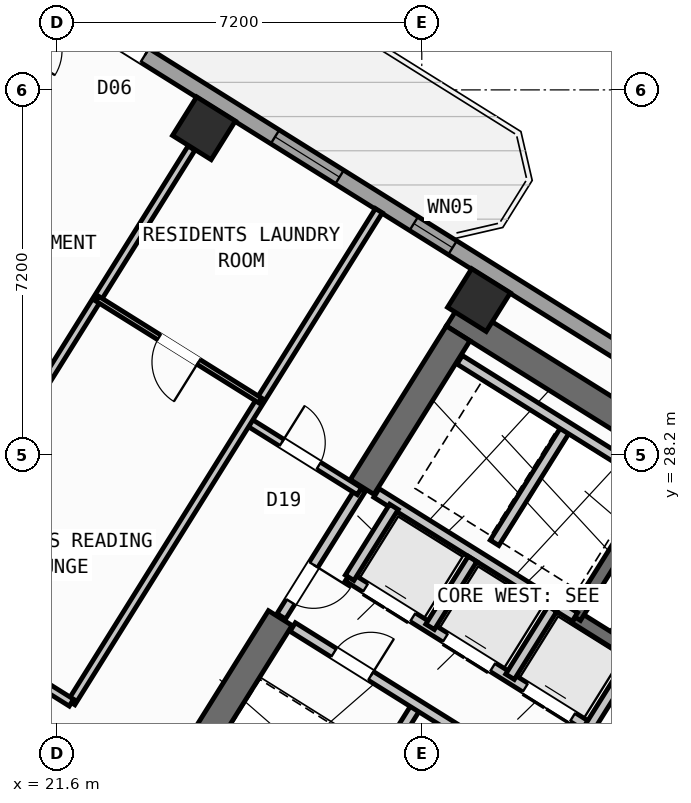
"""IFC4 building model, lengths in metres.
Left out: names, types, materials, properties, quantities, classifications, styles, units other than length and angle.
Written with IfcOpenShell. Run it as: python <this file> out.ifc"""

import sys

from ifc_helpers import new_model, si_unit, direction, frame, frame_2d, origin, origin_2d, place, context, subcontext, project, spatial, rectangle, hollow_rectangle, extrude, source, transform, mapped, element, fill, save


model = new_model("IFC4")
c1 = context("Model", 3, precision=1e-05, world=origin(), true_north=direction((0.0, 1.0)))
c2 = subcontext(c1, "Body", "Model", "MODEL_VIEW")
j1 = project(units=[si_unit("LENGTHUNIT", "METRE"), si_unit("PLANEANGLEUNIT", "RADIAN")], contexts=[c1])
p1 = place(None, origin())
s1 = spatial("IfcSite", under=j1, at=p1, CompositionType="ELEMENT")
p2 = place(p1, origin())
s2 = spatial("IfcBuilding", under=s1, at=p2, CompositionType="ELEMENT")
p3 = place(p2, frame((0.0, 0.0, 155.1)))
s3 = spatial("IfcBuildingStorey", under=s2, at=p3, CompositionType="ELEMENT", Elevation=155.1)
p4 = place(p3, frame((40.573, 24.01, 0.0), z_axis=(0.0, 0.0, 1.0), x_axis=(-0.848047359947, 0.529920442413, 0.0)))
e1 = element("IfcWall", 1, at=p4, inside=s3, PredefinedType="SHEAR", context=c2, shape_type="SweptSolid", body=[
    extrude(rectangle(XDim=13.14, YDim=0.55, at=frame_2d((6.57, 0.0))), origin(), (0.0, 0.0, 1.0), 3.35),
])
p5 = place(p3, frame((29.517, 30.594, 0.0), z_axis=(0.0, 0.0, 1.0), x_axis=(-0.529906864564, -0.848055844204, 0.0)))
e2 = element("IfcWall", 2, at=p5, inside=s3, PredefinedType="SHEAR", context=c2, shape_type="SweptSolid", body=[
    extrude(rectangle(XDim=3.575, YDim=0.55, at=frame_2d((1.788, 0.0))), origin(), (0.0, 0.0, 1.0), 3.35),
])
p6 = place(p3, frame((26.007, 24.976, 0.0), z_axis=(0.0, 0.0, 1.0), x_axis=(-0.529923795287, -0.848045264823, 0.0)))
e3 = element("IfcWall", 3, at=p6, inside=s3, PredefinedType="SHEAR", context=c2, shape_type="SweptSolid", body=[
    extrude(rectangle(XDim=6.425, YDim=0.55, at=frame_2d((3.212, 0.0))), origin(), (0.0, 0.0, 1.0), 3.35),
])
m1 = source(origin(), c2, "Body", "SweptSolid", [
    extrude(hollow_rectangle(XDim=0.9, YDim=0.9, WallThickness=0.036, at=origin_2d()), origin(), (0.0, 0.0, 1.0), 3.6),
])
for number, where, z_axis, x_axis in (
    (4, (29.928, 31.251, 0.0), (0.0, 0.0, 1.0), (-0.848, 0.53, 0.0)),
    (5, (24.5, 34.643, 0.0), (0.0, 0.0, 1.0), (-0.848, 0.53, 0.0)),
):
    element("IfcColumn", number, at=place(p3, frame(where, z_axis=z_axis, x_axis=x_axis)), inside=s3, PredefinedType="COLUMN", context=c2, shape_type="MappedRepresentation", body=[
        mapped(m1, transform((0.0, 0.0, 0.0), scale=1.0)),
    ])
p7 = place(p3, frame((29.268, 6.429, 0.0), z_axis=(0.0, 0.0, 1.0), x_axis=(-0.848049971435, 0.529916263149, 0.0)))
e6 = element("IfcWall", 6, at=p7, inside=s3, PredefinedType="STANDARD", context=c2, shape_type="SweptSolid", body=[
    extrude(rectangle(XDim=31.588, YDim=0.32, at=frame_2d((15.794, 0.0))), origin(), (0.0, 0.0, 1.0), 3.35),
])
p8 = place(p7, frame((16.362, 0.0, 0.0)))
e7 = element("IfcOpeningElement", 7, at=p8, cuts=e6, PredefinedType="OPENING", context=c2, shape_type="SweptSolid", body=[
    extrude(rectangle(XDim=1.2, YDim=2.15, at=frame_2d((0.6, 1.075))), frame((0.0, 0.17, 0.0), z_axis=(0.0, -1.0, 0.0), x_axis=(1.0, 0.0, 0.0)), (0.0, 0.0, 1.0), 0.34),
])
p9 = place(p7, frame((2.989, 0.0, 0.8)))
e8 = element("IfcOpeningElement", 8, at=p9, cuts=e6, PredefinedType="OPENING", context=c2, shape_type="SweptSolid", body=[
    extrude(rectangle(XDim=2.1, YDim=1.55, at=frame_2d((1.05, 0.775))), frame((0.0, 0.17, 0.0), z_axis=(0.0, -1.0, 0.0), x_axis=(1.0, 0.0, 0.0)), (0.0, 0.0, 1.0), 0.34),
])
p10 = place(p7, frame((8.359, 0.0, 0.8)))
e9 = element("IfcOpeningElement", 9, at=p10, cuts=e6, PredefinedType="OPENING", context=c2, shape_type="SweptSolid", body=[
    extrude(rectangle(XDim=2.1, YDim=1.55, at=frame_2d((1.05, 0.775))), frame((0.0, 0.17, 0.0), z_axis=(0.0, -1.0, 0.0), x_axis=(1.0, 0.0, 0.0)), (0.0, 0.0, 1.0), 0.34),
])
p11 = place(p7, frame((13.284, 0.0, 0.95)))
e10 = element("IfcOpeningElement", 10, at=p11, cuts=e6, PredefinedType="OPENING", context=c2, shape_type="SweptSolid", body=[
    extrude(rectangle(XDim=1.2, YDim=1.4, at=frame_2d((0.6, 0.7))), frame((0.0, 0.17, 0.0), z_axis=(0.0, -1.0, 0.0), x_axis=(1.0, 0.0, 0.0)), (0.0, 0.0, 1.0), 0.34),
])
p12 = place(p7, frame((20.259, 0.0, 0.95)))
e11 = element("IfcOpeningElement", 11, at=p12, cuts=e6, PredefinedType="OPENING", context=c2, shape_type="SweptSolid", body=[
    extrude(rectangle(XDim=1.2, YDim=1.4, at=frame_2d((0.6, 0.7))), frame((0.0, 0.17, 0.0), z_axis=(0.0, -1.0, 0.0), x_axis=(1.0, 0.0, 0.0)), (0.0, 0.0, 1.0), 0.34),
])
p13 = place(p7, frame((22.929, 0.0, 0.95)))
e12 = element("IfcOpeningElement", 12, at=p13, cuts=e6, PredefinedType="OPENING", context=c2, shape_type="SweptSolid", body=[
    extrude(rectangle(XDim=1.2, YDim=1.4, at=frame_2d((0.6, 0.7))), frame((0.0, 0.17, 0.0), z_axis=(0.0, -1.0, 0.0), x_axis=(1.0, 0.0, 0.0)), (0.0, 0.0, 1.0), 0.34),
])
p14 = place(p7, frame((27.481, 0.0, 0.8)))
e13 = element("IfcOpeningElement", 13, at=p14, cuts=e6, PredefinedType="OPENING", context=c2, shape_type="SweptSolid", body=[
    extrude(rectangle(XDim=2.1, YDim=1.55, at=frame_2d((1.05, 0.775))), frame((0.0, 0.17, 0.0), z_axis=(0.0, -1.0, 0.0), x_axis=(1.0, 0.0, 0.0)), (0.0, 0.0, 1.0), 0.34),
])
p15 = place(p3, frame((14.138, 41.825, 0.0), z_axis=(0.0, 0.0, 1.0), x_axis=(0.848046498049, -0.529921821731, 0.0)))
e14 = element("IfcWall", 14, at=p15, inside=s3, PredefinedType="STANDARD", context=c2, shape_type="SweptSolid", body=[
    extrude(rectangle(XDim=31.588, YDim=0.32, at=frame_2d((15.794, 0.0))), origin(), (0.0, 0.0, 1.0), 3.35),
])
p16 = place(p15, frame((9.792, 0.0, 0.0)))
e15 = element("IfcOpeningElement", 15, at=p16, cuts=e14, PredefinedType="OPENING", context=c2, shape_type="SweptSolid", body=[
    extrude(rectangle(XDim=1.05, YDim=2.15, at=frame_2d((0.525, 1.075))), frame((0.0, 0.17, 0.0), z_axis=(0.0, -1.0, 0.0), x_axis=(1.0, 0.0, 0.0)), (0.0, 0.0, 1.0), 0.34),
])
p17 = place(p15, frame((0.791, 0.0, 0.85)))
e16 = element("IfcOpeningElement", 16, at=p17, cuts=e14, PredefinedType="OPENING", context=c2, shape_type="SweptSolid", body=[
    extrude(rectangle(XDim=1.8, YDim=1.5, at=frame_2d((0.9, 0.75))), frame((0.0, 0.17, 0.0), z_axis=(0.0, -1.0, 0.0), x_axis=(1.0, 0.0, 0.0)), (0.0, 0.0, 1.0), 0.34),
])
p18 = place(p15, frame((3.996, 0.0, 0.95)))
e17 = element("IfcOpeningElement", 17, at=p18, cuts=e14, PredefinedType="OPENING", context=c2, shape_type="SweptSolid", body=[
    extrude(rectangle(XDim=1.2, YDim=1.4, at=frame_2d((0.6, 0.7))), frame((0.0, 0.17, 0.0), z_axis=(0.0, -1.0, 0.0), x_axis=(1.0, 0.0, 0.0)), (0.0, 0.0, 1.0), 0.34),
])
p19 = place(p15, frame((13.874, 0.0, 0.85)))
e18 = element("IfcOpeningElement", 18, at=p19, cuts=e14, PredefinedType="OPENING", context=c2, shape_type="SweptSolid", body=[
    extrude(rectangle(XDim=1.5, YDim=1.5, at=frame_2d((0.75, 0.75))), frame((0.0, 0.17, 0.0), z_axis=(0.0, -1.0, 0.0), x_axis=(1.0, 0.0, 0.0)), (0.0, 0.0, 1.0), 0.34),
])
p20 = place(p15, frame((17.104, 0.0, 1.0)))
e19 = element("IfcOpeningElement", 19, at=p20, cuts=e14, PredefinedType="OPENING", context=c2, shape_type="SweptSolid", body=[
    extrude(rectangle(XDim=0.9, YDim=1.25, at=frame_2d((0.45, 0.625))), frame((0.0, 0.17, 0.0), z_axis=(0.0, -1.0, 0.0), x_axis=(1.0, 0.0, 0.0)), (0.0, 0.0, 1.0), 0.34),
])
p21 = place(p15, frame((22.069, 0.0, 1.0)))
e20 = element("IfcOpeningElement", 20, at=p21, cuts=e14, PredefinedType="OPENING", context=c2, shape_type="SweptSolid", body=[
    extrude(rectangle(XDim=0.9, YDim=1.25, at=frame_2d((0.45, 0.625))), frame((0.0, 0.17, 0.0), z_axis=(0.0, -1.0, 0.0), x_axis=(1.0, 0.0, 0.0)), (0.0, 0.0, 1.0), 0.34),
])
p22 = place(p15, frame((27.519, 0.0, 1.0)))
e21 = element("IfcOpeningElement", 21, at=p22, cuts=e14, PredefinedType="OPENING", context=c2, shape_type="SweptSolid", body=[
    extrude(rectangle(XDim=0.9, YDim=1.25, at=frame_2d((0.45, 0.625))), frame((0.0, 0.17, 0.0), z_axis=(0.0, -1.0, 0.0), x_axis=(1.0, 0.0, 0.0)), (0.0, 0.0, 1.0), 0.34),
])
p23 = place(p3, frame((38.046, 21.108, 0.0), z_axis=(0.0, 0.0, 1.0), x_axis=(-0.848054434086, 0.529909121291, 0.0)))
e22 = element("IfcWall", 22, at=p23, inside=s3, PredefinedType="SHEAR", context=c2, shape_type="SweptSolid", body=[
    extrude(rectangle(XDim=7.33, YDim=0.26, at=frame_2d((3.665, 0.0))), origin(), (0.0, 0.0, 1.0), 3.35),
])
p24 = place(p23, frame((0.22, 0.0, 0.0)))
e23 = element("IfcOpeningElement", 23, at=p24, cuts=e22, PredefinedType="OPENING", context=c2, shape_type="SweptSolid", body=[
    extrude(rectangle(XDim=1.1, YDim=2.1, at=frame_2d((0.55, 1.05))), frame((0.0, 0.14, 0.0), z_axis=(0.0, -1.0, 0.0), x_axis=(1.0, 0.0, 0.0)), (0.0, 0.0, 1.0), 0.28),
])
p25 = place(p3, frame((33.496, 27.677, 0.0), z_axis=(0.0, 0.0, 1.0), x_axis=(-0.529908658664, -0.84805472316, 0.0)))
e24 = element("IfcWall", 24, at=p25, inside=s3, PredefinedType="SHEAR", context=c2, shape_type="SweptSolid", body=[
    extrude(rectangle(XDim=3.16, YDim=0.26, at=frame_2d((1.58, 0.0))), origin(), (0.0, 0.0, 1.0), 3.35),
])
p26 = place(p3, frame((31.822, 24.998, 0.0), z_axis=(0.0, 0.0, 1.0), x_axis=(-0.848036912365, 0.52993716162, 0.0)))
e25 = element("IfcWall", 25, at=p26, inside=s3, PredefinedType="STANDARD", context=c2, shape_type="SweptSolid", body=[
    extrude(rectangle(XDim=4.618, YDim=0.2, at=frame_2d((2.309, 0.0))), origin(), (0.0, 0.0, 1.0), 3.34),
])
p27 = place(p3, frame((32.108, 22.814, 0.0), z_axis=(0.0, 0.0, 1.0), x_axis=(-0.848042229521, 0.529928652696, 0.0)))
e26 = element("IfcWall", 26, at=p27, inside=s3, PredefinedType="STANDARD", context=c2, shape_type="SweptSolid", body=[
    extrude(rectangle(XDim=5.62, YDim=0.2, at=frame_2d((2.81, 0.0))), origin(), (0.0, 0.0, 1.0), 3.34),
])
p28 = place(p27, frame((0.39, 0.0, 0.0)))
e27 = element("IfcOpeningElement", 27, at=p28, cuts=e26, PredefinedType="OPENING", context=c2, shape_type="SweptSolid", body=[
    extrude(rectangle(XDim=1.1, YDim=2.15, at=frame_2d((0.55, 1.075))), frame((0.0, 0.11, 0.0), z_axis=(0.0, -1.0, 0.0), x_axis=(1.0, 0.0, 0.0)), (0.0, 0.0, 1.0), 0.22),
])
p29 = place(p27, frame((2.25, 0.0, 0.0)))
e28 = element("IfcOpeningElement", 28, at=p29, cuts=e26, PredefinedType="OPENING", context=c2, shape_type="SweptSolid", body=[
    extrude(rectangle(XDim=1.1, YDim=2.15, at=frame_2d((0.55, 1.075))), frame((0.0, 0.11, 0.0), z_axis=(0.0, -1.0, 0.0), x_axis=(1.0, 0.0, 0.0)), (0.0, 0.0, 1.0), 0.22),
])
p30 = place(p27, frame((4.11, 0.0, 0.0)))
e29 = element("IfcOpeningElement", 29, at=p30, cuts=e26, PredefinedType="OPENING", context=c2, shape_type="SweptSolid", body=[
    extrude(rectangle(XDim=1.1, YDim=2.15, at=frame_2d((0.55, 1.075))), frame((0.0, 0.11, 0.0), z_axis=(0.0, -1.0, 0.0), x_axis=(1.0, 0.0, 0.0)), (0.0, 0.0, 1.0), 0.22),
])
p31 = place(p3, frame((32.982, 24.213, 0.0), z_axis=(0.0, 0.0, 1.0), x_axis=(-0.529839334948, -0.84809803628, 0.0)))
e30 = element("IfcWall", 30, at=p31, inside=s3, PredefinedType="STANDARD", context=c2, shape_type="SweptSolid", body=[
    extrude(rectangle(XDim=1.65, YDim=0.2, at=frame_2d((0.825, 0.0))), origin(), (0.0, 0.0, 1.0), 3.34),
])
p32 = place(p3, frame((28.25, 27.17, 0.0), z_axis=(0.0, 0.0, 1.0), x_axis=(-0.529905827651, -0.848056492117, 0.0)))
e31 = element("IfcWall", 31, at=p32, inside=s3, PredefinedType="STANDARD", context=c2, shape_type="SweptSolid", body=[
    extrude(rectangle(XDim=1.65, YDim=0.2, at=frame_2d((0.825, 0.0))), origin(), (0.0, 0.0, 1.0), 3.34),
])
p33 = place(p3, frame((31.645, 28.716, 0.0), z_axis=(0.0, 0.0, 1.0), x_axis=(-0.52986693015, -0.848080795876, 0.0)))
e32 = element("IfcWall", 32, at=p33, inside=s3, PredefinedType="STANDARD", context=c2, shape_type="SweptSolid", body=[
    extrude(rectangle(XDim=2.66, YDim=0.2, at=frame_2d((1.33, 0.0))), origin(), (0.0, 0.0, 1.0), 3.34),
])
p34 = place(p3, frame((33.363, 27.69, 0.0), z_axis=(0.0, 0.0, 1.0), x_axis=(-0.848047090064, 0.529920874315, 0.0)))
e33 = element("IfcWall", 33, at=p34, inside=s3, PredefinedType="STANDARD", context=c2, shape_type="SweptSolid", body=[
    extrude(rectangle(XDim=4.498, YDim=0.2, at=frame_2d((2.249, 0.0))), origin(), (0.0, 0.0, 1.0), 3.34),
])
for number, where, z_axis, x_axis in (
    (34, (31.379, 25.156, 0.0), (0.0, 0.0, 1.0), (-0.53, -0.848, 0.0)),
    (35, (29.801, 26.142, 0.0), (0.0, 0.0, 1.0), (-0.53, -0.848, 0.0)),
):
    element("IfcWall", number, at=place(p3, frame(where, z_axis=z_axis, x_axis=x_axis)), inside=s3, PredefinedType="STANDARD", context=c2, shape_type="SweptSolid", body=[
        extrude(rectangle(XDim=1.58, YDim=0.2, at=frame_2d((0.79, 0.0))), origin(), (0.0, 0.0, 1.0), 3.34),
    ])
p35 = place(p3, frame((28.71, 23.263, 0.0), z_axis=(0.0, 0.0, 1.0), x_axis=(-0.529907497854, -0.848055448493, 0.0)))
e36 = element("IfcWall", 36, at=p35, inside=s3, PredefinedType="STANDARD", context=c2, shape_type="SweptSolid", body=[
    extrude(rectangle(XDim=2.88, YDim=0.2, at=frame_2d((1.44, 0.0))), origin(), (0.0, 0.0, 1.0), 3.34),
])
p36 = place(p3, frame((31.525, 21.504, 0.0), z_axis=(0.0, 0.0, 1.0), x_axis=(-0.848040211232, 0.529931882541, 0.0)))
e37 = element("IfcWall", 37, at=p36, inside=s3, PredefinedType="STANDARD", context=c2, shape_type="SweptSolid", body=[
    extrude(rectangle(XDim=6.218, YDim=0.2, at=frame_2d((3.109, 0.0))), origin(), (0.0, 0.0, 1.0), 3.34),
])
p37 = place(p36, frame((4.4, 0.0, 0.0)))
e38 = element("IfcOpeningElement", 38, at=p37, cuts=e37, PredefinedType="OPENING", context=c2, shape_type="SweptSolid", body=[
    extrude(rectangle(XDim=0.86, YDim=2.05, at=frame_2d((0.43, 1.025))), frame((0.0, 0.11, 0.0), z_axis=(0.0, -1.0, 0.0), x_axis=(1.0, 0.0, 0.0)), (0.0, 0.0, 1.0), 0.22),
])
p38 = place(p36, frame((0.35, 0.0, 0.0)))
e39 = element("IfcOpeningElement", 39, at=p38, cuts=e37, PredefinedType="OPENING", context=c2, shape_type="SweptSolid", body=[
    extrude(rectangle(XDim=0.86, YDim=2.05, at=frame_2d((0.43, 1.025))), frame((0.0, 0.11, 0.0), z_axis=(0.0, -1.0, 0.0), x_axis=(1.0, 0.0, 0.0)), (0.0, 0.0, 1.0), 0.22),
])
p39 = place(p3, frame((27.596, 27.52, 0.0), z_axis=(0.0, 0.0, 1.0), x_axis=(-0.529865479138, -0.848081702443, 0.0)))
e40 = element("IfcWall", 40, at=p39, inside=s3, PredefinedType="STANDARD", context=c2, shape_type="SweptSolid", body=[
    extrude(rectangle(XDim=2.96, YDim=0.2, at=frame_2d((1.48, 0.0))), origin(), (0.0, 0.0, 1.0), 3.34),
])
p40 = place(p39, frame((1.76, 0.0, 0.0)))
e41 = element("IfcOpeningElement", 41, at=p40, cuts=e40, PredefinedType="OPENING", context=c2, shape_type="SweptSolid", body=[
    extrude(rectangle(XDim=0.86, YDim=2.05, at=frame_2d((0.43, 1.025))), frame((0.0, 0.11, 0.0), z_axis=(0.0, -1.0, 0.0), x_axis=(1.0, 0.0, 0.0)), (0.0, 0.0, 1.0), 0.22),
])
p41 = place(p3, frame((27.57, 27.478, 0.0), z_axis=(0.0, 0.0, 1.0), x_axis=(-0.848050851465, 0.529914854792, 0.0)))
e42 = element("IfcWall", 42, at=p41, inside=s3, PredefinedType="PARTITIONING", context=c2, shape_type="SweptSolid", body=[
    extrude(rectangle(XDim=2.61, YDim=0.16, at=frame_2d((1.305, 0.0))), origin(), (0.0, 0.0, 1.0), 3.34),
])
p42 = place(p41, frame((0.95, 0.0, 0.0)))
e43 = element("IfcOpeningElement", 43, at=p42, cuts=e42, PredefinedType="OPENING", context=c2, shape_type="SweptSolid", body=[
    extrude(rectangle(XDim=0.86, YDim=2.05, at=frame_2d((0.43, 1.025))), frame((0.0, 0.09, 0.0), z_axis=(0.0, -1.0, 0.0), x_axis=(1.0, 0.0, 0.0)), (0.0, 0.0, 1.0), 0.18),
])
p43 = place(p3, frame((27.953, 33.016, 0.0), z_axis=(0.0, 0.0, 1.0), x_axis=(-0.529905022231, -0.848056995381, 0.0)))
e44 = element("IfcWall", 44, at=p43, inside=s3, PredefinedType="PARTITIONING", context=c2, shape_type="SweptSolid", body=[
    extrude(rectangle(XDim=11.45, YDim=0.16, at=frame_2d((5.725, 0.0))), origin(), (0.0, 0.0, 1.0), 3.34),
])
p44 = place(p3, frame((21.885, 23.306, 0.0), z_axis=(0.0, 0.0, 1.0), x_axis=(-0.848052408131, 0.529912363569, 0.0)))
e45 = element("IfcWall", 45, at=p44, inside=s3, PredefinedType="PARTITIONING", context=c2, shape_type="SweptSolid", body=[
    extrude(rectangle(XDim=16.73, YDim=0.16, at=frame_2d((8.365, 0.0))), origin(), (0.0, 0.0, 1.0), 3.34),
])
p45 = place(p44, frame((1.395, 0.0, 0.0)))
e46 = element("IfcOpeningElement", 46, at=p45, cuts=e45, PredefinedType="OPENING", context=c2, shape_type="SweptSolid", body=[
    extrude(rectangle(XDim=1.0, YDim=2.1, at=frame_2d((0.5, 1.05))), frame((0.0, 0.09, 0.0), z_axis=(0.0, -1.0, 0.0), x_axis=(1.0, 0.0, 0.0)), (0.0, 0.0, 1.0), 0.18),
])
p46 = place(p44, frame((7.82, 0.0, 0.0)))
e47 = element("IfcOpeningElement", 47, at=p46, cuts=e45, PredefinedType="OPENING", context=c2, shape_type="SweptSolid", body=[
    extrude(rectangle(XDim=1.0, YDim=2.1, at=frame_2d((0.5, 1.05))), frame((0.0, 0.09, 0.0), z_axis=(0.0, -1.0, 0.0), x_axis=(1.0, 0.0, 0.0)), (0.0, 0.0, 1.0), 0.18),
])
p47 = place(p44, frame((11.14, 0.0, 0.0)))
e48 = element("IfcOpeningElement", 48, at=p47, cuts=e45, PredefinedType="OPENING", context=c2, shape_type="SweptSolid", body=[
    extrude(rectangle(XDim=1.0, YDim=2.1, at=frame_2d((0.5, 1.05))), frame((0.0, 0.09, 0.0), z_axis=(0.0, -1.0, 0.0), x_axis=(1.0, 0.0, 0.0)), (0.0, 0.0, 1.0), 0.18),
])
p48 = place(p3, frame((24.256, 34.251, 0.0), z_axis=(0.0, 0.0, 1.0), x_axis=(-0.529919772691, -0.848047778437, 0.0)))
e49 = element("IfcWall", 49, at=p48, inside=s3, PredefinedType="PARTITIONING", context=c2, shape_type="SweptSolid", body=[
    extrude(rectangle(XDim=6.376, YDim=0.16, at=frame_2d((3.188, 0.0))), origin(), (0.0, 0.0, 1.0), 2.775),
])
p49 = place(p3, frame((25.612, 29.269, 0.0), z_axis=(0.0, 0.0, 1.0), x_axis=(-0.84803087207, 0.529946827537, 0.0)))
e50 = element("IfcWall", 50, at=p49, inside=s3, PredefinedType="PARTITIONING", context=c2, shape_type="SweptSolid", body=[
    extrude(rectangle(XDim=3.79, YDim=0.11, at=frame_2d((1.895, 0.0))), origin(), (0.0, 0.0, 1.0), 3.34),
])
p50 = place(p49, frame((1.435, 0.0, 0.0)))
e51 = element("IfcOpeningElement", 51, at=p50, cuts=e50, PredefinedType="OPENING", context=c2, shape_type="SweptSolid", body=[
    extrude(rectangle(XDim=0.92, YDim=2.08, at=frame_2d((0.46, 1.04))), frame((0.0, 0.065, 0.0), z_axis=(0.0, -1.0, 0.0), x_axis=(1.0, 0.0, 0.0)), (0.0, 0.0, 1.0), 0.13),
])
p51 = place(p3, frame((21.517, 37.356, 0.0), z_axis=(0.0, 0.0, 1.0), x_axis=(-0.529919705034, -0.848047820713, 0.0)))
e52 = element("IfcWall", 52, at=p51, inside=s3, PredefinedType="PARTITIONING", context=c2, shape_type="SweptSolid", body=[
    extrude(rectangle(XDim=9.14, YDim=0.11, at=frame_2d((4.57, 0.0))), origin(), (0.0, 0.0, 1.0), 3.34),
])
p52 = place(p51, frame((0.47, 0.0, 0.0)))
e53 = element("IfcOpeningElement", 53, at=p52, cuts=e52, PredefinedType="OPENING", context=c2, shape_type="SweptSolid", body=[
    extrude(rectangle(XDim=0.92, YDim=2.08, at=frame_2d((0.46, 1.04))), frame((0.0, 0.065, 0.0), z_axis=(0.0, -1.0, 0.0), x_axis=(1.0, 0.0, 0.0)), (0.0, 0.0, 1.0), 0.13),
])
m2 = source(origin(), c2, "Body", "SweptSolid", [
    extrude(rectangle(XDim=1.05, YDim=2.15, at=frame_2d((0.525, 1.075))), frame((0.0, 0.025, 0.0), z_axis=(0.0, -1.0, 0.0), x_axis=(1.0, 0.0, 0.0)), (0.0, 0.0, 1.0), 0.05),
])
p53 = place(p16, origin())
e54 = element("IfcDoor", 54, at=p53, inside=s3, OperationType="SINGLE_SWING_RIGHT", PredefinedType="DOOR", context=c2, shape_type="MappedRepresentation", body=[
    mapped(m2, transform((0.0, 0.0, 0.0), scale=1.0)),
])
fill(e15, e54)
m3 = source(origin(), c2, "Body", "SweptSolid", [
    extrude(rectangle(XDim=1.5, YDim=1.5, at=frame_2d((0.75, 0.75))), frame((0.0, 0.03, 0.0), z_axis=(0.0, -1.0, 0.0), x_axis=(1.0, 0.0, 0.0)), (0.0, 0.0, 1.0), 0.06),
])
p54 = place(p19, origin())
e55 = element("IfcWindow", 55, at=p54, inside=s3, PartitioningType="SINGLE_PANEL", PredefinedType="WINDOW", context=c2, shape_type="MappedRepresentation", body=[
    mapped(m3, transform((0.0, 0.0, 0.0), scale=1.0)),
])
fill(e18, e55)
m4 = source(origin(), c2, "Body", "SweptSolid", [
    extrude(rectangle(XDim=0.9, YDim=1.25, at=frame_2d((0.45, 0.625))), frame((0.0, 0.03, 0.0), z_axis=(0.0, -1.0, 0.0), x_axis=(1.0, 0.0, 0.0)), (0.0, 0.0, 1.0), 0.06),
])
p55 = place(p20, origin())
e56 = element("IfcWindow", 56, at=p55, inside=s3, PartitioningType="SINGLE_PANEL", PredefinedType="WINDOW", context=c2, shape_type="MappedRepresentation", body=[
    mapped(m4, transform((0.0, 0.0, 0.0), scale=1.0)),
])
fill(e19, e56)
m5 = source(origin(), c2, "Body", "SweptSolid", [
    extrude(rectangle(XDim=1.1, YDim=2.15, at=frame_2d((0.55, 1.075))), frame((0.0, 0.025, 0.0), z_axis=(0.0, -1.0, 0.0), x_axis=(1.0, 0.0, 0.0)), (0.0, 0.0, 1.0), 0.05),
])
p56 = place(p28, origin())
e57 = element("IfcDoor", 57, at=p56, inside=s3, OperationType="DOUBLE_DOOR_SLIDING", PredefinedType="DOOR", context=c2, shape_type="MappedRepresentation", body=[
    mapped(m5, transform((0.0, 0.0, 0.0), scale=1.0)),
])
fill(e27, e57)
p57 = place(p29, origin())
e58 = element("IfcDoor", 58, at=p57, inside=s3, OperationType="DOUBLE_DOOR_SLIDING", PredefinedType="DOOR", context=c2, shape_type="MappedRepresentation", body=[
    mapped(m5, transform((0.0, 0.0, 0.0), scale=1.0)),
])
fill(e28, e58)
p58 = place(p30, origin())
e59 = element("IfcDoor", 59, at=p58, inside=s3, OperationType="DOUBLE_DOOR_SLIDING", PredefinedType="DOOR", context=c2, shape_type="MappedRepresentation", body=[
    mapped(m5, transform((0.0, 0.0, 0.0), scale=1.0)),
])
fill(e29, e59)
m6 = source(origin(), c2, "Body", "SweptSolid", [
    extrude(rectangle(XDim=0.86, YDim=2.05, at=frame_2d((0.43, 1.025))), frame((0.0, 0.025, 0.0), z_axis=(0.0, -1.0, 0.0), x_axis=(1.0, 0.0, 0.0)), (0.0, 0.0, 1.0), 0.05),
])
p59 = place(p37, frame((0.86, 0.0, 0.0), z_axis=(0.0, 0.0, 1.0), x_axis=(-1.0, 0.0, 0.0)))
e60 = element("IfcDoor", 60, at=p59, inside=s3, OperationType="SINGLE_SWING_RIGHT", PredefinedType="DOOR", context=c2, shape_type="MappedRepresentation", body=[
    mapped(m6, transform((0.0, 0.0, 0.0), scale=1.0)),
])
fill(e38, e60)
p60 = place(p42, frame((0.86, 0.0, 0.0), z_axis=(0.0, 0.0, 1.0), x_axis=(-1.0, 0.0, 0.0)))
e61 = element("IfcDoor", 61, at=p60, inside=s3, OperationType="SINGLE_SWING_LEFT", PredefinedType="DOOR", context=c2, shape_type="MappedRepresentation", body=[
    mapped(m6, transform((0.0, 0.0, 0.0), scale=1.0)),
])
fill(e43, e61)
p61 = place(p40, origin())
e62 = element("IfcDoor", 62, at=p61, inside=s3, OperationType="SINGLE_SWING_LEFT", PredefinedType="DOOR", context=c2, shape_type="MappedRepresentation", body=[
    mapped(m6, transform((0.0, 0.0, 0.0), scale=1.0)),
])
fill(e41, e62)
m7 = source(origin(), c2, "Body", "SweptSolid", [
    extrude(rectangle(XDim=0.92, YDim=2.08, at=frame_2d((0.46, 1.04))), frame((0.0, 0.025, 0.0), z_axis=(0.0, -1.0, 0.0), x_axis=(1.0, 0.0, 0.0)), (0.0, 0.0, 1.0), 0.05),
])
p62 = place(p50, origin())
e63 = element("IfcDoor", 63, at=p62, inside=s3, OperationType="SINGLE_SWING_LEFT", PredefinedType="DOOR", context=c2, shape_type="MappedRepresentation", body=[
    mapped(m7, transform((0.0, 0.0, 0.0), scale=1.0)),
])
fill(e51, e63)
save(model, sys.argv[1])
